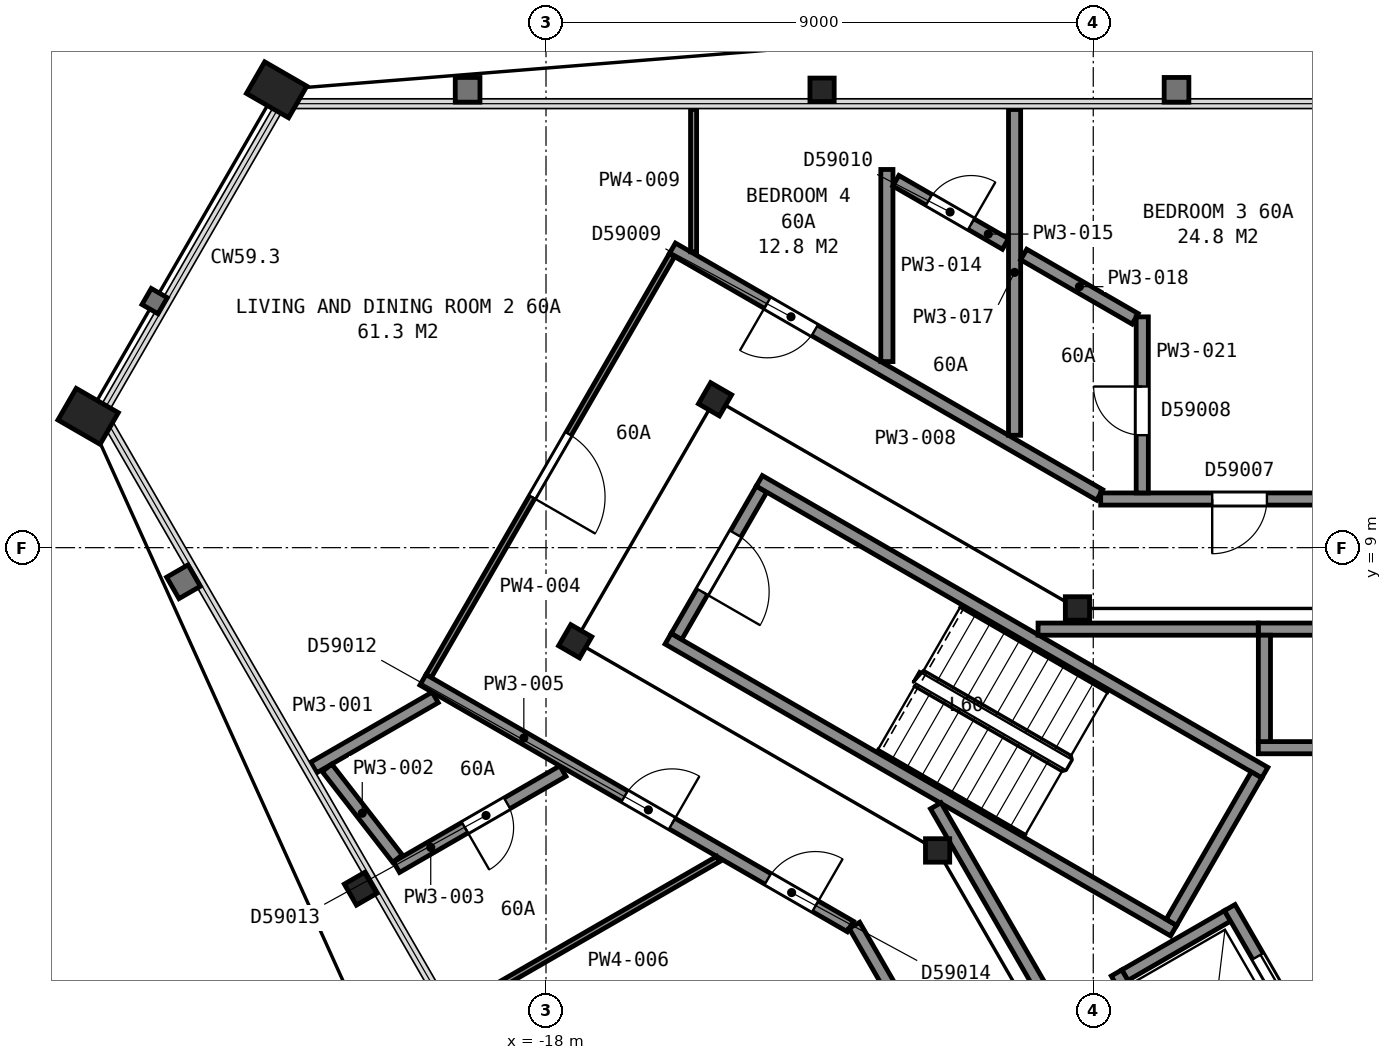
"""IFC4 building model, lengths in metres.
Left out: names, types, materials, properties, quantities, classifications, styles, units other than length and angle.
Written with IfcOpenShell. Run it as: python <this file> out.ifc"""

import sys

from ifc_helpers import new_model, si_unit, direction, frame, frame_2d, origin, origin_2d, place, context, subcontext, project, spatial, rectangle, hollow_rectangle, i_section, extrude, element, fill, save


model = new_model("IFC4")
c1 = context("Model", 3, precision=1e-05, world=origin(), true_north=direction((0.0, 1.0)))
c2 = subcontext(c1, "Body", "Model", "MODEL_VIEW")
j1 = project(units=[si_unit("LENGTHUNIT", "METRE"), si_unit("PLANEANGLEUNIT", "RADIAN")], contexts=[c1])
p1 = place(None, origin())
s1 = spatial("IfcSite", under=j1, at=p1, CompositionType="ELEMENT")
p2 = place(p1, origin())
s2 = spatial("IfcBuilding", under=s1, at=p2, CompositionType="ELEMENT")
p3 = place(p2, frame((0.0, 0.0, 239.7)))
s3 = spatial("IfcBuildingStorey", under=s2, at=p3, CompositionType="ELEMENT", Elevation=239.7)
p4 = place(p3, frame((-13.46, 16.53, 0.0), z_axis=(0.0, 0.0, 1.0), x_axis=(1.0, 0.0, 0.0)))
e1 = element("IfcColumn", 1, at=p4, inside=s3, PredefinedType="COLUMN", context=c2, shape_type="SweptSolid", body=[
    extrude(i_section(OverallWidth=0.399, OverallDepth=0.386, WebThickness=0.021, FlangeThickness=0.033, FilletRadius=0.015, at=origin_2d()), origin(), (0.0, 0.0, 1.0), 3.665),
])
for number, where, z_axis, x_axis in (
    (2, (-22.43, 16.53, 0.0), (0.0, 0.0, 1.0), (0.5, 0.866, 0.0)),
    (3, (-25.53, 11.16, 0.0), (0.0, 0.0, 1.0), (0.5, 0.866, 0.0)),
):
    element("IfcColumn", number, at=place(p3, frame(where, z_axis=z_axis, x_axis=x_axis)), inside=s3, PredefinedType="COLUMN", context=c2, shape_type="SweptSolid", body=[
        extrude(hollow_rectangle(XDim=0.6, YDim=0.8, WallThickness=0.05, at=origin_2d()), origin(), (0.0, 0.0, 1.0), 3.635),
    ])
p5 = place(p3, frame((-21.05, 3.39, 0.0), z_axis=(0.0, 0.0, 1.0), x_axis=(-0.5, 0.866025403784, 0.0)))
e4 = element("IfcColumn", 4, at=p5, inside=s3, PredefinedType="COLUMN", context=c2, shape_type="SweptSolid", body=[
    extrude(i_section(OverallWidth=0.399, OverallDepth=0.386, WebThickness=0.021, FlangeThickness=0.033, FilletRadius=0.015, at=origin_2d()), origin(), (0.0, 0.0, 1.0), 3.665),
])
p6 = place(p3, frame((-9.26, 8.0, 0.0), z_axis=(0.0, 0.0, 1.0), x_axis=(1.0, 0.0, 0.0)))
e5 = element("IfcColumn", 5, at=p6, inside=s3, PredefinedType="COLUMN", context=c2, shape_type="SweptSolid", body=[
    extrude(i_section(OverallWidth=0.399, OverallDepth=0.386, WebThickness=0.021, FlangeThickness=0.033, FilletRadius=0.015, at=origin_2d()), origin(), (0.0, 0.0, 1.0), 3.7),
])
for number, where, z_axis, x_axis in (
    (6, (-15.22, 11.44, 0.0), (0.0, 0.0, 1.0), (0.5, 0.866, 0.0)),
    (7, (-17.52, 7.46, 0.0), (0.0, 0.0, 1.0), (0.5, 0.866, 0.0)),
):
    element("IfcColumn", number, at=place(p3, frame(where, z_axis=z_axis, x_axis=x_axis)), inside=s3, PredefinedType="COLUMN", context=c2, shape_type="SweptSolid", body=[
        extrude(i_section(OverallWidth=0.401, OverallDepth=0.399, WebThickness=0.025, FlangeThickness=0.04, FilletRadius=0.015, at=origin_2d()), origin(), (0.0, 0.0, 1.0), 3.7),
    ])
p7 = place(p3, frame((-11.56, 4.02, 0.0), z_axis=(0.0, 0.0, 1.0), x_axis=(1.0, 0.0, 0.0)))
e8 = element("IfcColumn", 8, at=p7, inside=s3, PredefinedType="COLUMN", context=c2, shape_type="SweptSolid", body=[
    extrude(i_section(OverallWidth=0.399, OverallDepth=0.386, WebThickness=0.021, FlangeThickness=0.033, FilletRadius=0.015, at=origin_2d()), origin(), (0.0, 0.0, 1.0), 3.7),
])
p8 = place(p3, frame((-14.455, 9.962, 0.0), z_axis=(0.0, 0.0, 1.0), x_axis=(-0.500049511043, -0.865996816683, 0.0)))
e9 = element("IfcWall", 9, at=p8, inside=s3, PredefinedType="PARTITIONING", context=c2, shape_type="SweptSolid", body=[
    extrude(rectangle(XDim=2.8, YDim=0.2, at=frame_2d((1.4, 0.0))), origin(), (0.0, 0.0, 1.0), 3.45),
])
p9 = place(p8, frame((0.85, 0.0, 0.0)))
e10 = element("IfcOpeningElement", 10, at=p9, cuts=e9, PredefinedType="OPENING", context=c2, shape_type="SweptSolid", body=[
    extrude(rectangle(XDim=1.1, YDim=2.1, at=frame_2d((0.55, 1.05))), frame((0.0, 0.11, 0.0), z_axis=(0.0, -1.0, 0.0), x_axis=(1.0, 0.0, 0.0)), (0.0, 0.0, 1.0), 0.22),
])
for number, where, z_axis, x_axis in (
    (11, (-7.678, 2.701, 0.0), (0.0, 0.0, 1.0), (-0.866, 0.5, 0.0)),
    (12, (-6.178, 5.299, 0.0), (0.0, 0.0, 1.0), (-0.866, 0.5, 0.0)),
):
    element("IfcWall", number, at=place(p3, frame(where, z_axis=z_axis, x_axis=x_axis)), inside=s3, PredefinedType="PARTITIONING", context=c2, shape_type="SweptSolid", body=[
        extrude(rectangle(XDim=9.6, YDim=0.2, at=frame_2d((4.8, 0.0))), origin(), (0.0, 0.0, 1.0), 3.45),
    ])
p10 = place(p3, frame((-6.315, 5.262, 0.0), z_axis=(0.0, 0.0, 1.0), x_axis=(-0.500049511043, -0.865996816683, 0.0)))
e13 = element("IfcWall", 13, at=p10, inside=s3, PredefinedType="PARTITIONING", context=c2, shape_type="SweptSolid", body=[
    extrude(rectangle(XDim=2.8, YDim=0.2, at=frame_2d((1.4, 0.0))), origin(), (0.0, 0.0, 1.0), 3.45),
])
for number, where, z_axis, x_axis in (
    (14, (-6.285, 5.71, 0.0), (0.0, 0.0, 1.0), (1.0, 0.0, 0.0)),
    (15, (-6.285, 7.66, 0.0), (0.0, 0.0, 1.0), (1.0, 0.0, 0.0)),
):
    element("IfcWall", number, at=place(p3, frame(where, z_axis=z_axis, x_axis=x_axis)), inside=s3, PredefinedType="PARTITIONING", context=c2, shape_type="SweptSolid", body=[
        extrude(rectangle(XDim=2.35, YDim=0.2, at=frame_2d((1.175, 0.0))), origin(), (0.0, 0.0, 1.0), 3.7),
    ])
p11 = place(p3, frame((-8.48, 1.969, 0.0), z_axis=(0.0, 0.0, 1.0), x_axis=(0.866000020948, 0.500043961785, 0.0)))
e16 = element("IfcWall", 16, at=p11, inside=s3, PredefinedType="PARTITIONING", context=c2, shape_type="SweptSolid", body=[
    extrude(rectangle(XDim=1.95, YDim=0.2, at=frame_2d((0.975, 0.0))), origin(), (0.0, 0.0, 1.0), 3.7),
])
p12 = place(p3, frame((-6.185, 5.81, 0.0), z_axis=(0.0, 0.0, 1.0), x_axis=(0.0, 1.0, 0.0)))
e17 = element("IfcWall", 17, at=p12, inside=s3, PredefinedType="PARTITIONING", context=c2, shape_type="SweptSolid", body=[
    extrude(rectangle(XDim=1.75, YDim=0.2, at=frame_2d((0.875, 0.0))), origin(), (0.0, 0.0, 1.0), 3.7),
])
p13 = place(p3, frame((-5.28, 0.525, 0.0), z_axis=(0.0, 0.0, 1.0), x_axis=(-0.500037662692, 0.866003658127, 0.0)))
e18 = element("IfcWall", 18, at=p13, inside=s3, PredefinedType="PARTITIONING", context=c2, shape_type="SweptSolid", body=[
    extrude(rectangle(XDim=2.95, YDim=0.2, at=frame_2d((1.475, 0.0))), origin(), (0.0, 0.0, 1.0), 3.7),
])
p14 = place(p13, frame((0.925, 0.0, 0.0)))
e19 = element("IfcOpeningElement", 19, at=p14, cuts=e18, PredefinedType="OPENING", context=c2, shape_type="SweptSolid", body=[
    extrude(rectangle(XDim=1.1, YDim=2.1, at=frame_2d((0.55, 1.05))), frame((0.0, 0.11, 0.0), z_axis=(0.0, -1.0, 0.0), x_axis=(1.0, 0.0, 0.0)), (0.0, 0.0, 1.0), 0.22),
])
p15 = place(p3, frame((-7.242, -0.376, 0.0), z_axis=(0.0, 0.0, 1.0), x_axis=(-0.499996545922, 0.866027397988, 0.0)))
e20 = element("IfcWall", 20, at=p15, inside=s3, PredefinedType="PARTITIONING", context=c2, shape_type="SweptSolid", body=[
    extrude(rectangle(XDim=2.75, YDim=0.2, at=frame_2d((1.375, 0.0))), origin(), (0.0, 0.0, 1.0), 3.7),
])
p16 = place(p3, frame((-11.591, 4.755, 0.0), z_axis=(0.0, 0.0, 1.0), x_axis=(0.500043977787, -0.866000011708, 0.0)))
e21 = element("IfcWall", 21, at=p16, inside=s3, PredefinedType="PARTITIONING", context=c2, shape_type="SweptSolid", body=[
    extrude(rectangle(XDim=6.617, YDim=0.2, at=frame_2d((3.308, 0.0))), origin(), (0.0, 0.0, 1.0), 3.45),
])
p17 = place(p16, frame((3.695, 0.0, 0.0)))
e22 = element("IfcOpeningElement", 22, at=p17, cuts=e21, PredefinedType="OPENING", context=c2, shape_type="SweptSolid", body=[
    extrude(rectangle(XDim=1.8, YDim=2.1, at=frame_2d((0.9, 1.05))), frame((0.0, 0.11, 0.0), z_axis=(0.0, -1.0, 0.0), x_axis=(1.0, 0.0, 0.0)), (0.0, 0.0, 1.0), 0.22),
])
p18 = place(p3, frame((-9.908, 7.66, 0.0), z_axis=(0.0, 0.0, 1.0), x_axis=(1.0, 0.0, 0.0)))
e23 = element("IfcWall", 23, at=p18, inside=s3, PredefinedType="PARTITIONING", context=c2, shape_type="SweptSolid", body=[
    extrude(rectangle(XDim=3.621, YDim=0.2, at=frame_2d((1.811, 0.0))), origin(), (0.0, 0.0, 1.0), 3.45),
])
p19 = place(p3, frame((-21.821, 5.384, 0.0), z_axis=(0.0, 0.0, 1.0), x_axis=(0.866178541367, 0.499734664072, 0.0)))
e24 = element("IfcWall", 24, at=p19, inside=s3, PredefinedType="PARTITIONING", context=c2, shape_type="SweptSolid", body=[
    extrude(rectangle(XDim=2.308, YDim=0.2, at=frame_2d((1.154, 0.0))), origin(), (0.0, 0.0, 1.0), 2.713),
])
p20 = place(p3, frame((-21.602, 5.378, 0.0), z_axis=(0.0, 0.0, 1.0), x_axis=(0.613269592497, -0.789873665163, 0.0)))
e25 = element("IfcWall", 25, at=p20, inside=s3, PredefinedType="PARTITIONING", context=c2, shape_type="SweptSolid", body=[
    extrude(rectangle(XDim=1.89, YDim=0.2, at=frame_2d((0.945, 0.0))), origin(), (0.0, 0.0, 1.0), 2.713),
])
p21 = place(p3, frame((-20.458, 3.745, 0.0), z_axis=(0.0, 0.0, 1.0), x_axis=(0.865942402911, 0.500143734182, 0.0)))
e26 = element("IfcWall", 26, at=p21, inside=s3, PredefinedType="PARTITIONING", context=c2, shape_type="SweptSolid", body=[
    extrude(rectangle(XDim=3.16, YDim=0.2, at=frame_2d((1.58, 0.0))), origin(), (0.0, 0.0, 1.0), 2.713),
])
p22 = place(p21, frame((1.3, 0.0, 0.0)))
e27 = element("IfcOpeningElement", 27, at=p22, cuts=e26, PredefinedType="OPENING", context=c2, shape_type="SweptSolid", body=[
    extrude(rectangle(XDim=0.8, YDim=2.1, at=frame_2d((0.4, 1.05))), frame((0.0, 0.11, 0.0), z_axis=(0.0, -1.0, 0.0), x_axis=(1.0, 0.0, 0.0)), (0.0, 0.0, 1.0), 0.22),
])
p23 = place(p3, frame((-19.93, 6.888, 0.0), z_axis=(0.0, 0.0, 1.0), x_axis=(0.500420003794, 0.865782778648, 0.0)))
e28 = element("IfcWall", 28, at=p23, inside=s3, PredefinedType="PARTITIONING", context=c2, shape_type="SweptSolid", body=[
    extrude(rectangle(XDim=7.997, YDim=0.1, at=frame_2d((3.999, 0.0))), origin(), (0.0, 0.0, 1.0), 2.713),
])
p24 = place(p23, frame((3.4, 0.0, 0.0)))
e29 = element("IfcOpeningElement", 29, at=p24, cuts=e28, PredefinedType="OPENING", context=c2, shape_type="SweptSolid", body=[
    extrude(rectangle(XDim=1.2, YDim=2.1, at=frame_2d((0.6, 1.05))), frame((0.0, 0.06, 0.0), z_axis=(0.0, -1.0, 0.0), x_axis=(1.0, 0.0, 0.0)), (0.0, 0.0, 1.0), 0.12),
])
p25 = place(p3, frame((-12.995, 2.77, 0.0), z_axis=(0.0, 0.0, 1.0), x_axis=(-0.866100425926, 0.499870035319, 0.0)))
e30 = element("IfcWall", 30, at=p25, inside=s3, PredefinedType="PARTITIONING", context=c2, shape_type="SweptSolid", body=[
    extrude(rectangle(XDim=8.115, YDim=0.2, at=frame_2d((4.058, 0.0))), origin(), (0.0, 0.0, 1.0), 2.713),
])
p26 = place(p25, frame((3.385, 0.0, 0.0)))
e31 = element("IfcOpeningElement", 31, at=p26, cuts=e30, PredefinedType="OPENING", context=c2, shape_type="SweptSolid", body=[
    extrude(rectangle(XDim=0.9, YDim=2.1, at=frame_2d((0.45, 1.05))), frame((0.0, 0.11, 0.0), z_axis=(0.0, -1.0, 0.0), x_axis=(1.0, 0.0, 0.0)), (0.0, 0.0, 1.0), 0.22),
])
p27 = place(p25, frame((0.665, 0.0, 0.0)))
e32 = element("IfcOpeningElement", 32, at=p27, cuts=e30, PredefinedType="OPENING", context=c2, shape_type="SweptSolid", body=[
    extrude(rectangle(XDim=0.9, YDim=2.1, at=frame_2d((0.45, 1.05))), frame((0.0, 0.11, 0.0), z_axis=(0.0, -1.0, 0.0), x_axis=(1.0, 0.0, 0.0)), (0.0, 0.0, 1.0), 0.22),
])
p28 = place(p3, frame((-19.507, 1.375, 0.0), z_axis=(0.0, 0.0, 1.0), x_axis=(0.86604843891, 0.499960099869, 0.0)))
e33 = element("IfcWall", 33, at=p28, inside=s3, PredefinedType="PARTITIONING", context=c2, shape_type="SweptSolid", body=[
    extrude(rectangle(XDim=5.01, YDim=0.1, at=frame_2d((2.505, 0.0))), origin(), (0.0, 0.0, 1.0), 2.713),
])
p29 = place(p3, frame((-15.921, 13.923, 0.0), z_axis=(0.0, 0.0, 1.0), x_axis=(0.866079355551, -0.499906541154, 0.0)))
e34 = element("IfcWall", 34, at=p29, inside=s3, PredefinedType="PARTITIONING", context=c2, shape_type="SweptSolid", body=[
    extrude(rectangle(XDim=8.113, YDim=0.2, at=frame_2d((4.056, 0.0))), origin(), (0.0, 0.0, 1.0), 2.713),
])
p30 = place(p29, frame((1.802, 0.0, 0.0)))
e35 = element("IfcOpeningElement", 35, at=p30, cuts=e34, PredefinedType="OPENING", context=c2, shape_type="SweptSolid", body=[
    extrude(rectangle(XDim=0.9, YDim=2.1, at=frame_2d((0.45, 1.05))), frame((0.0, 0.11, 0.0), z_axis=(0.0, -1.0, 0.0), x_axis=(1.0, 0.0, 0.0)), (0.0, 0.0, 1.0), 0.22),
])
p31 = place(p3, frame((-15.573, 13.866, 0.0), z_axis=(0.0, 0.0, 1.0), x_axis=(0.0, 1.0, 0.0)))
e36 = element("IfcWall", 36, at=p31, inside=s3, PredefinedType="PARTITIONING", context=c2, shape_type="SweptSolid", body=[
    extrude(rectangle(XDim=2.34, YDim=0.1, at=frame_2d((1.17, 0.0))), origin(), (0.0, 0.0, 1.0), 2.713),
])
p32 = place(p3, frame((-4.077, -12.543, 0.0), z_axis=(0.0, 0.0, 1.0), x_axis=(-0.499968768298, 0.866043434665, 0.0)))
e37 = element("IfcWall", 37, at=p32, inside=s3, PredefinedType="PARTITIONING", context=c2, shape_type="SweptSolid", body=[
    extrude(rectangle(XDim=17.703, YDim=0.2, at=frame_2d((8.852, 0.0))), origin(), (0.0, 0.0, 1.0), 2.713),
])
p33 = place(p32, frame((11.052, 0.0, 0.0)))
e38 = element("IfcOpeningElement", 38, at=p33, cuts=e37, PredefinedType="OPENING", context=c2, shape_type="SweptSolid", body=[
    extrude(rectangle(XDim=0.9, YDim=2.1, at=frame_2d((0.45, 1.05))), frame((0.0, 0.11, 0.0), z_axis=(0.0, -1.0, 0.0), x_axis=(1.0, 0.0, 0.0)), (0.0, 0.0, 1.0), 0.22),
])
p34 = place(p32, frame((7.098, 0.0, 0.0)))
e39 = element("IfcOpeningElement", 39, at=p34, cuts=e37, PredefinedType="OPENING", context=c2, shape_type="SweptSolid", body=[
    extrude(rectangle(XDim=0.9, YDim=2.1, at=frame_2d((0.45, 1.05))), frame((0.0, 0.11, 0.0), z_axis=(0.0, -1.0, 0.0), x_axis=(1.0, 0.0, 0.0)), (0.0, 0.0, 1.0), 0.22),
])
p35 = place(p32, frame((2.099, 0.0, 0.0)))
e40 = element("IfcOpeningElement", 40, at=p35, cuts=e37, PredefinedType="OPENING", context=c2, shape_type="SweptSolid", body=[
    extrude(rectangle(XDim=0.9, YDim=2.1, at=frame_2d((0.45, 1.05))), frame((0.0, 0.11, 0.0), z_axis=(0.0, -1.0, 0.0), x_axis=(1.0, 0.0, 0.0)), (0.0, 0.0, 1.0), 0.22),
])
p36 = place(p3, frame((-12.394, 12.06, 0.0), z_axis=(0.0, 0.0, 1.0), x_axis=(0.0, 1.0, 0.0)))
e41 = element("IfcWall", 41, at=p36, inside=s3, PredefinedType="PARTITIONING", context=c2, shape_type="SweptSolid", body=[
    extrude(rectangle(XDim=3.16, YDim=0.2, at=frame_2d((1.58, 0.0))), origin(), (0.0, 0.0, 1.0), 2.713),
])
p37 = place(p3, frame((-10.444, 13.995, 0.0), z_axis=(0.0, 0.0, 1.0), x_axis=(-0.866134808485, 0.499810457605, 0.0)))
e42 = element("IfcWall", 42, at=p37, inside=s3, PredefinedType="PARTITIONING", context=c2, shape_type="SweptSolid", body=[
    extrude(rectangle(XDim=2.081, YDim=0.2, at=frame_2d((1.041, 0.0))), origin(), (0.0, 0.0, 1.0), 2.713),
])
p38 = place(p37, frame((0.651, 0.0, 0.0)))
e43 = element("IfcOpeningElement", 43, at=p38, cuts=e42, PredefinedType="OPENING", context=c2, shape_type="SweptSolid", body=[
    extrude(rectangle(XDim=0.8, YDim=2.1, at=frame_2d((0.4, 1.05))), frame((0.0, 0.11, 0.0), z_axis=(0.0, -1.0, 0.0), x_axis=(1.0, 0.0, 0.0)), (0.0, 0.0, 1.0), 0.22),
])
p39 = place(p3, frame((-10.294, 10.848, 0.0), z_axis=(0.0, 0.0, 1.0), x_axis=(0.0, 1.0, 0.0)))
e44 = element("IfcWall", 44, at=p39, inside=s3, PredefinedType="PARTITIONING", context=c2, shape_type="SweptSolid", body=[
    extrude(rectangle(XDim=5.358, YDim=0.2, at=frame_2d((2.679, 0.0))), origin(), (0.0, 0.0, 1.0), 2.713),
])
p40 = place(p3, frame((-10.144, 13.822, 0.0), z_axis=(0.0, 0.0, 1.0), x_axis=(0.866062654302, -0.49993547466, 0.0)))
e45 = element("IfcWall", 45, at=p40, inside=s3, PredefinedType="PARTITIONING", context=c2, shape_type="SweptSolid", body=[
    extrude(rectangle(XDim=2.116, YDim=0.2, at=frame_2d((1.058, 0.0))), origin(), (0.0, 0.0, 1.0), 2.713),
])
p41 = place(p3, frame((-8.878, 9.8, 0.0), z_axis=(0.0, 0.0, 1.0), x_axis=(1.0, 0.0, 0.0)))
e46 = element("IfcWall", 46, at=p41, inside=s3, PredefinedType="PARTITIONING", context=c2, shape_type="SweptSolid", body=[
    extrude(rectangle(XDim=17.756, YDim=0.2, at=frame_2d((8.878, 0.0))), origin(), (0.0, 0.0, 1.0), 2.713),
])
p42 = place(p41, frame((12.792, 0.0, 0.0)))
e47 = element("IfcOpeningElement", 47, at=p42, cuts=e46, PredefinedType="OPENING", context=c2, shape_type="SweptSolid", body=[
    extrude(rectangle(XDim=1.2, YDim=2.1, at=frame_2d((0.6, 1.05))), frame((0.0, 0.11, 0.0), z_axis=(0.0, -1.0, 0.0), x_axis=(1.0, 0.0, 0.0)), (0.0, 0.0, 1.0), 0.22),
])
p43 = place(p41, frame((5.013, 0.0, 0.0)))
e48 = element("IfcOpeningElement", 48, at=p43, cuts=e46, PredefinedType="OPENING", context=c2, shape_type="SweptSolid", body=[
    extrude(rectangle(XDim=0.9, YDim=2.1, at=frame_2d((0.45, 1.05))), frame((0.0, 0.11, 0.0), z_axis=(0.0, -1.0, 0.0), x_axis=(1.0, 0.0, 0.0)), (0.0, 0.0, 1.0), 0.22),
])
p44 = place(p41, frame((1.834, 0.0, 0.0)))
e49 = element("IfcOpeningElement", 49, at=p44, cuts=e46, PredefinedType="OPENING", context=c2, shape_type="SweptSolid", body=[
    extrude(rectangle(XDim=0.9, YDim=2.1, at=frame_2d((0.45, 1.05))), frame((0.0, 0.11, 0.0), z_axis=(0.0, -1.0, 0.0), x_axis=(1.0, 0.0, 0.0)), (0.0, 0.0, 1.0), 0.22),
])
p45 = place(p3, frame((-8.194, 9.9, 0.0), z_axis=(0.0, 0.0, 1.0), x_axis=(0.0, 1.0, 0.0)))
e50 = element("IfcWall", 50, at=p45, inside=s3, PredefinedType="PARTITIONING", context=c2, shape_type="SweptSolid", body=[
    extrude(rectangle(XDim=2.896, YDim=0.2, at=frame_2d((1.448, 0.0))), origin(), (0.0, 0.0, 1.0), 2.713),
])
p46 = place(p45, frame((0.95, 0.0, 0.0)))
e51 = element("IfcOpeningElement", 51, at=p46, cuts=e50, PredefinedType="OPENING", context=c2, shape_type="SweptSolid", body=[
    extrude(rectangle(XDim=0.8, YDim=2.1, at=frame_2d((0.4, 1.05))), frame((0.0, 0.11, 0.0), z_axis=(0.0, -1.0, 0.0), x_axis=(1.0, 0.0, 0.0)), (0.0, 0.0, 1.0), 0.22),
])
p47 = place(p9, origin())
e52 = element("IfcDoor", 52, at=p47, inside=s3, OperationType="SINGLE_SWING_RIGHT", PredefinedType="DOOR", context=c2, shape_type="SweptSolid", body=[
    extrude(rectangle(XDim=1.1, YDim=2.1, at=frame_2d((0.55, 1.05))), frame((0.0, 0.025, 0.0), z_axis=(0.0, -1.0, 0.0), x_axis=(1.0, 0.0, 0.0)), (0.0, 0.0, 1.0), 0.05),
])
fill(e10, e52)
p48 = place(p14, origin())
e53 = element("IfcDoor", 53, at=p48, inside=s3, OperationType="SLIDING_TO_LEFT", PredefinedType="DOOR", context=c2, shape_type="SweptSolid", body=[
    extrude(rectangle(XDim=1.1, YDim=2.1, at=frame_2d((0.55, 1.05))), frame((0.0, 0.025, 0.0), z_axis=(0.0, -1.0, 0.0), x_axis=(1.0, 0.0, 0.0)), (0.0, 0.0, 1.0), 0.05),
])
fill(e19, e53)
p49 = place(p22, origin())
e54 = element("IfcDoor", 54, at=p49, inside=s3, OperationType="SINGLE_SWING_LEFT", PredefinedType="DOOR", context=c2, shape_type="SweptSolid", body=[
    extrude(rectangle(XDim=0.8, YDim=2.1, at=frame_2d((0.4, 1.05))), frame((0.0, 0.025, 0.0), z_axis=(0.0, -1.0, 0.0), x_axis=(1.0, 0.0, 0.0)), (0.0, 0.0, 1.0), 0.05),
])
fill(e27, e54)
p50 = place(p24, origin())
e55 = element("IfcDoor", 55, at=p50, inside=s3, OperationType="SINGLE_SWING_LEFT", PredefinedType="DOOR", context=c2, shape_type="SweptSolid", body=[
    extrude(rectangle(XDim=1.2, YDim=2.1, at=frame_2d((0.6, 1.05))), frame((0.0, 0.025, 0.0), z_axis=(0.0, -1.0, 0.0), x_axis=(1.0, 0.0, 0.0)), (0.0, 0.0, 1.0), 0.05),
])
fill(e29, e55)
p51 = place(p26, origin())
e56 = element("IfcDoor", 56, at=p51, inside=s3, OperationType="SINGLE_SWING_LEFT", PredefinedType="DOOR", context=c2, shape_type="SweptSolid", body=[
    extrude(rectangle(XDim=0.9, YDim=2.1, at=frame_2d((0.45, 1.05))), frame((0.0, 0.025, 0.0), z_axis=(0.0, -1.0, 0.0), x_axis=(1.0, 0.0, 0.0)), (0.0, 0.0, 1.0), 0.05),
])
fill(e31, e56)
p52 = place(p27, origin())
e57 = element("IfcDoor", 57, at=p52, inside=s3, OperationType="SINGLE_SWING_LEFT", PredefinedType="DOOR", context=c2, shape_type="SweptSolid", body=[
    extrude(rectangle(XDim=0.9, YDim=2.1, at=frame_2d((0.45, 1.05))), frame((0.0, 0.025, 0.0), z_axis=(0.0, -1.0, 0.0), x_axis=(1.0, 0.0, 0.0)), (0.0, 0.0, 1.0), 0.05),
])
fill(e32, e57)
p53 = place(p30, origin())
e58 = element("IfcDoor", 58, at=p53, inside=s3, OperationType="SINGLE_SWING_LEFT", PredefinedType="DOOR", context=c2, shape_type="SweptSolid", body=[
    extrude(rectangle(XDim=0.9, YDim=2.1, at=frame_2d((0.45, 1.05))), frame((0.0, 0.025, 0.0), z_axis=(0.0, -1.0, 0.0), x_axis=(1.0, 0.0, 0.0)), (0.0, 0.0, 1.0), 0.05),
])
fill(e35, e58)
p54 = place(p38, origin())
e59 = element("IfcDoor", 59, at=p54, inside=s3, OperationType="SINGLE_SWING_LEFT", PredefinedType="DOOR", context=c2, shape_type="SweptSolid", body=[
    extrude(rectangle(XDim=0.8, YDim=2.1, at=frame_2d((0.4, 1.05))), frame((0.0, 0.025, 0.0), z_axis=(0.0, -1.0, 0.0), x_axis=(1.0, 0.0, 0.0)), (0.0, 0.0, 1.0), 0.05),
])
fill(e43, e59)
p55 = place(p44, origin())
e60 = element("IfcDoor", 60, at=p55, inside=s3, OperationType="SINGLE_SWING_LEFT", PredefinedType="DOOR", context=c2, shape_type="SweptSolid", body=[
    extrude(rectangle(XDim=0.9, YDim=2.1, at=frame_2d((0.45, 1.05))), frame((0.0, 0.025, 0.0), z_axis=(0.0, -1.0, 0.0), x_axis=(1.0, 0.0, 0.0)), (0.0, 0.0, 1.0), 0.05),
])
fill(e49, e60)
p56 = place(p46, origin())
e61 = element("IfcDoor", 61, at=p56, inside=s3, OperationType="SINGLE_SWING_RIGHT", PredefinedType="DOOR", context=c2, shape_type="SweptSolid", body=[
    extrude(rectangle(XDim=0.8, YDim=2.1, at=frame_2d((0.4, 1.05))), frame((0.0, 0.025, 0.0), z_axis=(0.0, -1.0, 0.0), x_axis=(1.0, 0.0, 0.0)), (0.0, 0.0, 1.0), 0.05),
])
fill(e51, e61)
save(model, sys.argv[1])
